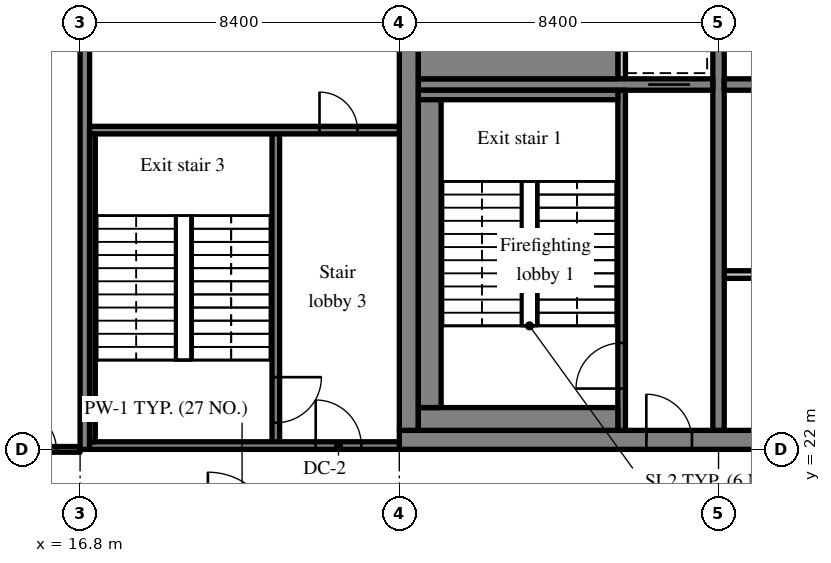
"""IFC4 building model, lengths in metres.
Left out: names, types, materials, properties, quantities, classifications, styles, units other than length and angle.
Written with IfcOpenShell. Run it as: python <this file> out.ifc"""

import sys

from ifc_helpers import new_model, si_unit, direction, frame, frame_2d, origin, place, context, subcontext, project, spatial, rectangle, extrude, source, transform, mapped, element, fill, save


model = new_model("IFC4")
c1 = context("Model", 3, precision=1e-05, world=origin(), true_north=direction((0.0, 1.0)))
c2 = subcontext(c1, "Body", "Model", "MODEL_VIEW")
j1 = project(units=[si_unit("LENGTHUNIT", "METRE"), si_unit("PLANEANGLEUNIT", "RADIAN")], contexts=[c1])
p1 = place(None, origin())
s1 = spatial("IfcSite", under=j1, at=p1, CompositionType="ELEMENT")
p2 = place(p1, origin())
s2 = spatial("IfcBuilding", under=s1, at=p2, CompositionType="ELEMENT")
p3 = place(p2, frame((0.0, 0.0, 305.7)))
s3 = spatial("IfcBuildingStorey", under=s2, at=p3, CompositionType="ELEMENT", Elevation=305.7)
m1 = source(origin(), c2, "Body", "SweptSolid", [
    extrude(rectangle(XDim=50.4, YDim=0.5, at=frame_2d((25.2, 0.0))), origin(), (0.0, 0.0, 1.0), 3.72),
])
p4 = place(p3, frame((25.2, 22.25, 0.0), z_axis=(0.0, 0.0, 1.0), x_axis=(1.0, 0.0, 0.0)))
e1 = element("IfcWall", 1, at=p4, inside=s3, PredefinedType="SHEAR", context=c2, shape_type="MappedRepresentation", body=[
    mapped(m1, transform((0.0, 0.0, 0.0), scale=1.0)),
])
m2 = source(origin(), c2, "Body", "SweptSolid", [
    extrude(rectangle(XDim=1.8, YDim=2.1, at=frame_2d((0.9, 1.05))), frame((0.0, 0.26, 0.0), z_axis=(0.0, -1.0, 0.0), x_axis=(1.0, 0.0, 0.0)), (0.0, 0.0, 1.0), 0.52),
])
p5 = place(p4, frame((15.9, 0.0, 0.0)))
e2 = element("IfcOpeningElement", 2, at=p5, cuts=e1, PredefinedType="OPENING", context=c2, shape_type="MappedRepresentation", body=[
    mapped(m2, transform((0.0, 0.0, 0.0), scale=1.0)),
])
m3 = source(origin(), c2, "Body", "SweptSolid", [
    extrude(rectangle(XDim=0.9, YDim=2.1, at=frame_2d((0.45, 1.05))), frame((0.0, 0.26, 0.0), z_axis=(0.0, -1.0, 0.0), x_axis=(1.0, 0.0, 0.0)), (0.0, 0.0, 1.0), 0.52),
])
p6 = place(p4, frame((11.175, 0.0, 0.0)))
e3 = element("IfcOpeningElement", 3, at=p6, cuts=e1, PredefinedType="OPENING", context=c2, shape_type="MappedRepresentation", body=[
    mapped(m3, transform((0.0, 0.0, 0.0), scale=1.0)),
])
p7 = place(p4, frame((21.525, 0.0, 0.0)))
e4 = element("IfcOpeningElement", 4, at=p7, cuts=e1, PredefinedType="OPENING", context=c2, shape_type="MappedRepresentation", body=[
    mapped(m3, transform((0.0, 0.0, 0.0), scale=1.0)),
])
p8 = place(p4, frame((32.7, 0.0, 0.0)))
e5 = element("IfcOpeningElement", 5, at=p8, cuts=e1, PredefinedType="OPENING", context=c2, shape_type="MappedRepresentation", body=[
    mapped(m2, transform((0.0, 0.0, 0.0), scale=1.0)),
])
m4 = source(origin(), c2, "Body", "SweptSolid", [
    extrude(rectangle(XDim=1.2, YDim=2.1, at=frame_2d((0.6, 1.05))), frame((0.0, 0.26, 0.0), z_axis=(0.0, -1.0, 0.0), x_axis=(1.0, 0.0, 0.0)), (0.0, 0.0, 1.0), 0.52),
])
p9 = place(p4, frame((6.5, 0.0, 0.0)))
e6 = element("IfcOpeningElement", 6, at=p9, cuts=e1, PredefinedType="OPENING", context=c2, shape_type="MappedRepresentation", body=[
    mapped(m4, transform((0.0, 0.0, 0.0), scale=1.0)),
])
p10 = place(p4, frame((47.975, 0.0, 0.0)))
e7 = element("IfcOpeningElement", 7, at=p10, cuts=e1, PredefinedType="OPENING", context=c2, shape_type="MappedRepresentation", body=[
    mapped(m4, transform((0.0, 0.0, 0.0), scale=1.0)),
])
m5 = source(origin(), c2, "Body", "SweptSolid", [
    extrude(rectangle(XDim=19.0, YDim=0.5, at=frame_2d((9.5, 0.0))), origin(), (0.0, 0.0, 1.0), 3.72),
])
p11 = place(p3, frame((25.45, 22.5, 0.0), z_axis=(0.0, 0.0, 1.0), x_axis=(0.0, 1.0, 0.0)))
e8 = element("IfcWall", 8, at=p11, inside=s3, PredefinedType="SHEAR", context=c2, shape_type="MappedRepresentation", body=[
    mapped(m5, transform((0.0, 0.0, 0.0), scale=1.0)),
])
m6 = source(origin(), c2, "Body", "SweptSolid", [
    extrude(rectangle(XDim=19.0, YDim=0.3, at=frame_2d((9.5, 0.0))), origin(), (0.0, 0.0, 1.0), 3.72),
])
p12 = place(p3, frame((33.6, 22.5, 0.0), z_axis=(0.0, 0.0, 1.0), x_axis=(0.0, 1.0, 0.0)))
e9 = element("IfcWall", 9, at=p12, inside=s3, PredefinedType="SHEAR", context=c2, shape_type="MappedRepresentation", body=[
    mapped(m6, transform((0.0, 0.0, 0.0), scale=1.0)),
])
m7 = source(origin(), c2, "Body", "SweptSolid", [
    extrude(rectangle(XDim=1.1, YDim=2.1, at=frame_2d((0.55, 1.05))), frame((0.0, 0.16, 0.0), z_axis=(0.0, -1.0, 0.0), x_axis=(1.0, 0.0, 0.0)), (0.0, 0.0, 1.0), 0.32),
])
p13 = place(p12, frame((12.95, 0.0, 0.0)))
e10 = element("IfcOpeningElement", 10, at=p13, cuts=e9, PredefinedType="OPENING", context=c2, shape_type="MappedRepresentation", body=[
    mapped(m7, transform((0.0, 0.0, 0.0), scale=1.0)),
])
m8 = source(origin(), c2, "Body", "SweptSolid", [
    extrude(rectangle(XDim=7.75, YDim=0.3, at=frame_2d((3.875, 0.0))), origin(), (0.0, 0.0, 1.0), 3.72),
])
p14 = place(p3, frame((25.7, 31.6, 0.0), z_axis=(0.0, 0.0, 1.0), x_axis=(1.0, 0.0, 0.0)))
e11 = element("IfcWall", 11, at=p14, inside=s3, PredefinedType="SHEAR", context=c2, shape_type="MappedRepresentation", body=[
    mapped(m8, transform((0.0, 0.0, 0.0), scale=1.0)),
])
p15 = place(p14, frame((6.05, 0.0, 0.0)))
e12 = element("IfcOpeningElement", 12, at=p15, cuts=e11, PredefinedType="OPENING", context=c2, shape_type="MappedRepresentation", body=[
    mapped(m7, transform((0.0, 0.0, 0.0), scale=1.0)),
])
m9 = source(origin(), c2, "Body", "SweptSolid", [
    extrude(rectangle(XDim=16.5, YDim=0.3, at=frame_2d((8.25, 0.0))), origin(), (0.0, 0.0, 1.0), 3.72),
])
p16 = place(p3, frame((33.75, 31.6, 0.0), z_axis=(0.0, 0.0, 1.0), x_axis=(1.0, 0.0, 0.0)))
e13 = element("IfcWall", 13, at=p16, inside=s3, PredefinedType="SHEAR", context=c2, shape_type="MappedRepresentation", body=[
    mapped(m9, transform((0.0, 0.0, 0.0), scale=1.0)),
])
m10 = source(origin(), c2, "Body", "SweptSolid", [
    extrude(rectangle(XDim=1.0, YDim=2.1, at=frame_2d((0.5, 1.05))), frame((0.0, 0.16, 0.0), z_axis=(0.0, -1.0, 0.0), x_axis=(1.0, 0.0, 0.0)), (0.0, 0.0, 1.0), 0.32),
])
p17 = place(p16, frame((14.875, 0.0, 0.0)))
e14 = element("IfcOpeningElement", 14, at=p17, cuts=e13, PredefinedType="OPENING", context=c2, shape_type="MappedRepresentation", body=[
    mapped(m10, transform((0.0, 0.0, 0.0), scale=1.0)),
])
m11 = source(origin(), c2, "Body", "SweptSolid", [
    extrude(rectangle(XDim=18.4, YDim=0.25, at=frame_2d((9.2, 0.0))), origin(), (0.0, 0.0, 1.0), 3.72),
])
p18 = place(p3, frame((16.925, 22.0, 0.0), z_axis=(0.0, 0.0, 1.0), x_axis=(0.0, 1.0, 0.0)))
e15 = element("IfcWall", 15, at=p18, inside=s3, PredefinedType="SHEAR", context=c2, shape_type="MappedRepresentation", body=[
    mapped(m11, transform((0.0, 0.0, 0.0), scale=1.0)),
])
m12 = source(origin(), c2, "Body", "SweptSolid", [
    extrude(rectangle(XDim=6.15, YDim=0.2, at=frame_2d((3.075, 0.0))), origin(), (0.0, 0.0, 1.0), 3.72),
])
p19 = place(p3, frame((33.75, 26.6, 0.0), z_axis=(0.0, 0.0, 1.0), x_axis=(1.0, 0.0, 0.0)))
e16 = element("IfcWall", 16, at=p19, inside=s3, PredefinedType="PARTITIONING", context=c2, shape_type="MappedRepresentation", body=[
    mapped(m12, transform((0.0, 0.0, 0.0), scale=1.0)),
])
m13 = source(origin(), c2, "Body", "SweptSolid", [
    extrude(rectangle(XDim=8.95, YDim=0.2, at=frame_2d((4.475, 0.0))), origin(), (0.0, 0.0, 1.0), 3.72),
])
p20 = place(p3, frame((31.05, 22.5, 0.0), z_axis=(0.0, 0.0, 1.0), x_axis=(0.0, 1.0, 0.0)))
e17 = element("IfcWall", 17, at=p20, inside=s3, PredefinedType="SOLIDWALL", context=c2, shape_type="MappedRepresentation", body=[
    mapped(m13, transform((0.0, 0.0, 0.0), scale=1.0)),
])
m14 = source(origin(), c2, "Body", "SweptSolid", [
    extrude(rectangle(XDim=1.2, YDim=2.1, at=frame_2d((0.6, 1.05))), frame((0.0, 0.11, 0.0), z_axis=(0.0, -1.0, 0.0), x_axis=(1.0, 0.0, 0.0)), (0.0, 0.0, 1.0), 0.22),
])
p21 = place(p20, frame((1.1, 0.0, 0.0)))
e18 = element("IfcOpeningElement", 18, at=p21, cuts=e17, PredefinedType="OPENING", context=c2, shape_type="MappedRepresentation", body=[
    mapped(m14, transform((0.0, 0.0, 0.0), scale=1.0)),
])
m15 = source(origin(), c2, "Body", "SweptSolid", [
    extrude(rectangle(XDim=1.85, YDim=0.2, at=frame_2d((0.925, 0.0))), origin(), (0.0, 0.0, 1.0), 3.72),
])
p22 = place(p3, frame((31.05, 31.75, 0.0), z_axis=(0.0, 0.0, 1.0), x_axis=(0.0, 1.0, 0.0)))
e19 = element("IfcWall", 19, at=p22, inside=s3, PredefinedType="SOLIDWALL", context=c2, shape_type="MappedRepresentation", body=[
    mapped(m15, transform((0.0, 0.0, 0.0), scale=1.0)),
])
m16 = source(origin(), c2, "Body", "SweptSolid", [
    extrude(rectangle(XDim=8.3, YDim=0.2, at=frame_2d((4.15, 0.0))), origin(), (0.0, 0.0, 1.0), 3.72),
])
p23 = place(p3, frame((21.95, 22.1, 0.0), z_axis=(0.0, 0.0, 1.0), x_axis=(0.0, 1.0, 0.0)))
e20 = element("IfcWall", 20, at=p23, inside=s3, PredefinedType="SOLIDWALL", context=c2, shape_type="MappedRepresentation", body=[
    mapped(m16, transform((0.0, 0.0, 0.0), scale=1.0)),
])
p24 = place(p23, frame((0.6, 0.0, 0.0)))
e21 = element("IfcOpeningElement", 21, at=p24, cuts=e20, PredefinedType="OPENING", context=c2, shape_type="MappedRepresentation", body=[
    mapped(m14, transform((0.0, 0.0, 0.0), scale=1.0)),
])
m17 = source(origin(), c2, "Body", "SweptSolid", [
    extrude(rectangle(XDim=8.15, YDim=0.2, at=frame_2d((4.075, 0.0))), origin(), (0.0, 0.0, 1.0), 3.72),
])
p25 = place(p3, frame((17.05, 22.1, 0.0), z_axis=(0.0, 0.0, 1.0), x_axis=(1.0, 0.0, 0.0)))
e22 = element("IfcWall", 22, at=p25, inside=s3, PredefinedType="SOLIDWALL", context=c2, shape_type="MappedRepresentation", body=[
    mapped(m17, transform((0.0, 0.0, 0.0), scale=1.0)),
])
p26 = place(p25, frame((5.95, 0.0, 0.0)))
e23 = element("IfcOpeningElement", 23, at=p26, cuts=e22, PredefinedType="OPENING", context=c2, shape_type="MappedRepresentation", body=[
    mapped(m14, transform((0.0, 0.0, 0.0), scale=1.0)),
])
p27 = place(p3, frame((17.05, 30.4, 0.0), z_axis=(0.0, 0.0, 1.0), x_axis=(1.0, 0.0, 0.0)))
e24 = element("IfcWall", 24, at=p27, inside=s3, PredefinedType="SOLIDWALL", context=c2, shape_type="MappedRepresentation", body=[
    mapped(m17, transform((0.0, 0.0, 0.0), scale=1.0)),
])
m18 = source(origin(), c2, "Body", "SweptSolid", [
    extrude(rectangle(XDim=1.0, YDim=2.1, at=frame_2d((0.5, 1.05))), frame((0.0, 0.11, 0.0), z_axis=(0.0, -1.0, 0.0), x_axis=(1.0, 0.0, 0.0)), (0.0, 0.0, 1.0), 0.22),
])
p28 = place(p27, frame((6.05, 0.0, 0.0)))
e25 = element("IfcOpeningElement", 25, at=p28, cuts=e24, PredefinedType="OPENING", context=c2, shape_type="MappedRepresentation", body=[
    mapped(m18, transform((0.0, 0.0, 0.0), scale=1.0)),
])
m19 = source(origin(), c2, "Body", "SweptSolid", [
    extrude(rectangle(XDim=5.25, YDim=0.6, at=frame_2d((2.625, 0.0))), origin(), (0.0, 0.0, 1.0), 3.72),
])
p29 = place(p3, frame((25.7, 22.8, 0.0), z_axis=(0.0, 0.0, 1.0), x_axis=(1.0, 0.0, 0.0)))
e26 = element("IfcWall", 26, at=p29, inside=s3, PredefinedType="SOLIDWALL", context=c2, shape_type="MappedRepresentation", body=[
    mapped(m19, transform((0.0, 0.0, 0.0), scale=1.0)),
])
m20 = source(origin(), c2, "Body", "SweptSolid", [
    extrude(rectangle(XDim=5.25, YDim=0.25, at=frame_2d((2.625, 0.0))), origin(), (0.0, 0.0, 1.0), 3.72),
])
p30 = place(p3, frame((25.7, 31.325, 0.0), z_axis=(0.0, 0.0, 1.0), x_axis=(1.0, 0.0, 0.0)))
e27 = element("IfcWall", 27, at=p30, inside=s3, PredefinedType="SOLIDWALL", context=c2, shape_type="MappedRepresentation", body=[
    mapped(m20, transform((0.0, 0.0, 0.0), scale=1.0)),
])
m21 = source(origin(), c2, "Body", "SweptSolid", [
    extrude(rectangle(XDim=8.1, YDim=0.6, at=frame_2d((4.05, 0.0))), origin(), (0.0, 0.0, 1.0), 3.72),
])
p31 = place(p3, frame((26.0, 23.1, 0.0), z_axis=(0.0, 0.0, 1.0), x_axis=(0.0, 1.0, 0.0)))
e28 = element("IfcWall", 28, at=p31, inside=s3, PredefinedType="SOLIDWALL", context=c2, shape_type="MappedRepresentation", body=[
    mapped(m21, transform((0.0, 0.0, 0.0), scale=1.0)),
])
m22 = source(origin(), c2, "Body", "SweptSolid", [
    extrude(rectangle(XDim=8.1, YDim=0.15, at=frame_2d((4.05, 0.0))), origin(), (0.0, 0.0, 1.0), 3.72),
])
p32 = place(p3, frame((17.125, 22.2, 0.0), z_axis=(0.0, 0.0, 1.0), x_axis=(0.0, 1.0, 0.0)))
e29 = element("IfcWall", 29, at=p32, inside=s3, PredefinedType="SOLIDWALL", context=c2, shape_type="MappedRepresentation", body=[
    mapped(m22, transform((0.0, 0.0, 0.0), scale=1.0)),
])
m23 = source(origin(), c2, "Body", "SweptSolid", [
    extrude(rectangle(XDim=5.25, YDim=1.05, at=frame_2d((2.625, 0.0))), origin(), (0.0, 0.0, 1.0), 3.72),
])
p33 = place(p3, frame((25.7, 32.275, 0.0), z_axis=(0.0, 0.0, 1.0), x_axis=(1.0, 0.0, 0.0)))
e30 = element("IfcWall", 30, at=p33, inside=s3, PredefinedType="SOLIDWALL", context=c2, shape_type="MappedRepresentation", body=[
    mapped(m23, transform((0.0, 0.0, 0.0), scale=1.0)),
])
m24 = source(origin(), c2, "Body", "SweptSolid", [
    extrude(rectangle(XDim=1.9, YDim=0.15, at=frame_2d((0.95, 0.0))), origin(), (0.0, 0.0, 1.0), 3.02),
])
p34 = place(p3, frame((14.9, 22.0, 0.0), z_axis=(0.0, 0.0, 1.0), x_axis=(1.0, 0.0, 0.0)))
e31 = element("IfcWall", 31, at=p34, inside=s3, PredefinedType="PARTITIONING", context=c2, shape_type="MappedRepresentation", body=[
    mapped(m24, transform((0.0, 0.0, 0.0), scale=1.0)),
])
m25 = source(origin(), c2, "Body", "SweptSolid", [
    extrude(rectangle(XDim=1.0, YDim=2.1, at=frame_2d((0.5, 1.05))), frame((0.0, 0.085, 0.0), z_axis=(0.0, -1.0, 0.0), x_axis=(1.0, 0.0, 0.0)), (0.0, 0.0, 1.0), 0.17),
])
p35 = place(p34, frame((0.275, 0.0, 0.0)))
e32 = element("IfcOpeningElement", 32, at=p35, cuts=e31, PredefinedType="OPENING", context=c2, shape_type="MappedRepresentation", body=[
    mapped(m25, transform((0.0, 0.0, 0.0), scale=1.0)),
])
m26 = source(origin(), c2, "Body", "SweptSolid", [
    extrude(rectangle(XDim=1.2, YDim=2.1, at=frame_2d((0.6, 1.05))), frame((0.0, 0.025, 0.0), z_axis=(0.0, -1.0, 0.0), x_axis=(1.0, 0.0, 0.0)), (0.0, 0.0, 1.0), 0.05),
])
p36 = place(p21, origin())
e33 = element("IfcDoor", 33, at=p36, inside=s3, OperationType="SINGLE_SWING_LEFT", PredefinedType="DOOR", context=c2, shape_type="MappedRepresentation", body=[
    mapped(m26, transform((0.0, 0.0, 0.0), scale=1.0)),
])
fill(e18, e33)
m27 = source(origin(), c2, "Body", "SweptSolid", [
    extrude(rectangle(XDim=1.2, YDim=2.1, at=frame_2d((0.6, 1.05))), frame((0.0, 0.175, 0.0), z_axis=(0.0, -1.0, 0.0), x_axis=(1.0, 0.0, 0.0)), (0.0, 0.0, 1.0), 0.05),
])
p37 = place(p9, origin())
e34 = element("IfcDoor", 34, at=p37, inside=s3, OperationType="SINGLE_SWING_LEFT", PredefinedType="DOOR", context=c2, shape_type="MappedRepresentation", body=[
    mapped(m27, transform((0.0, 0.0, 0.0), scale=1.0)),
])
fill(e6, e34)
m28 = source(origin(), c2, "Body", "SweptSolid", [
    extrude(rectangle(XDim=1.1, YDim=2.1, at=frame_2d((0.55, 1.05))), frame((0.0, 0.025, 0.0), z_axis=(0.0, -1.0, 0.0), x_axis=(1.0, 0.0, 0.0)), (0.0, 0.0, 1.0), 0.05),
])
p38 = place(p15, origin())
e35 = element("IfcDoor", 35, at=p38, inside=s3, OperationType="SLIDING_TO_LEFT", PredefinedType="DOOR", context=c2, shape_type="MappedRepresentation", body=[
    mapped(m28, transform((0.0, 0.0, 0.0), scale=1.0)),
])
fill(e12, e35)
p39 = place(p24, origin())
e36 = element("IfcDoor", 36, at=p39, inside=s3, OperationType="SINGLE_SWING_RIGHT", PredefinedType="DOOR", context=c2, shape_type="MappedRepresentation", body=[
    mapped(m26, transform((0.0, 0.0, 0.0), scale=1.0)),
])
fill(e21, e36)
p40 = place(p26, origin())
e37 = element("IfcDoor", 37, at=p40, inside=s3, OperationType="SINGLE_SWING_LEFT", PredefinedType="DOOR", context=c2, shape_type="MappedRepresentation", body=[
    mapped(m26, transform((0.0, 0.0, 0.0), scale=1.0)),
])
fill(e23, e37)
m29 = source(origin(), c2, "Body", "SweptSolid", [
    extrude(rectangle(XDim=1.0, YDim=2.1, at=frame_2d((0.5, 1.05))), frame((0.0, 0.025, 0.0), z_axis=(0.0, -1.0, 0.0), x_axis=(1.0, 0.0, 0.0)), (0.0, 0.0, 1.0), 0.05),
])
p41 = place(p28, origin())
e38 = element("IfcDoor", 38, at=p41, inside=s3, OperationType="SINGLE_SWING_LEFT", PredefinedType="DOOR", context=c2, shape_type="MappedRepresentation", body=[
    mapped(m29, transform((0.0, 0.0, 0.0), scale=1.0)),
])
fill(e25, e38)
p42 = place(p35, origin())
e39 = element("IfcDoor", 39, at=p42, inside=s3, OperationType="SINGLE_SWING_LEFT", PredefinedType="DOOR", context=c2, shape_type="MappedRepresentation", body=[
    mapped(m29, transform((0.0, 0.0, 0.0), scale=1.0)),
])
fill(e32, e39)
save(model, sys.argv[1])
